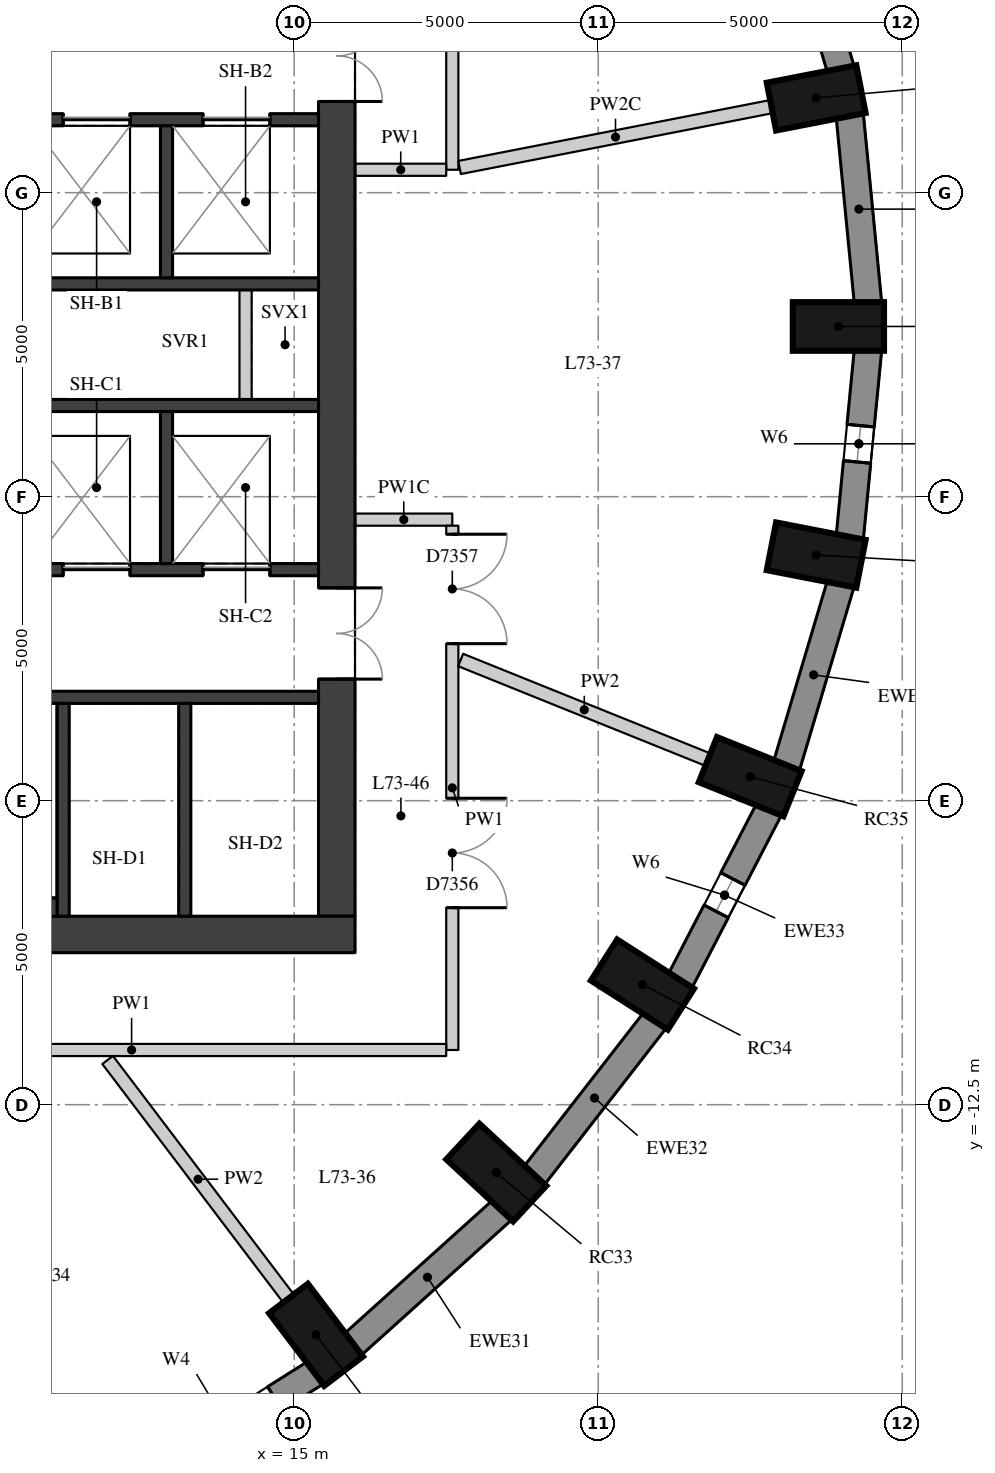
"""IFC4 building model, lengths in metres.
Left out: names, types, materials, properties, quantities, classifications, styles, units other than length and angle.
Written with IfcOpenShell. Run it as: python <this file> out.ifc"""

import sys

from ifc_helpers import new_model, si_unit, direction, frame, frame_2d, origin, origin_2d, place, context, subcontext, project, spatial, rectangle, extrude, element, fill, save


model = new_model("IFC4")
c1 = context("Model", 3, precision=1e-05, world=origin(), true_north=direction((0.0, 1.0)))
c2 = subcontext(c1, "Body", "Model", "MODEL_VIEW")
j1 = project(units=[si_unit("LENGTHUNIT", "METRE"), si_unit("PLANEANGLEUNIT", "RADIAN")], contexts=[c1])
p1 = place(None, origin())
s1 = spatial("IfcSite", under=j1, at=p1, CompositionType="ELEMENT")
p2 = place(p1, origin())
s2 = spatial("IfcBuilding", under=s1, at=p2, CompositionType="ELEMENT")
p3 = place(p2, frame((0.0, 0.0, 256.4)))
s3 = spatial("IfcBuildingStorey", under=s2, at=p3, CompositionType="ELEMENT", Elevation=256.4)
for number, where, z_axis, x_axis in (
    (1, (23.95, 0.3, 0.0), (0.0, 0.0, 1.0), (1.0, 0.0, 0.0)),
    (2, (23.585, 4.06, 0.0), (0.0, 0.0, 1.0), (0.981, 0.192, 0.0)),
    (3, (15.359, -16.285, 0.0), (0.0, 0.0, 1.0), (0.604, -0.797, 0.0)),
    (4, (18.323, -13.616, 0.0), (0.0, 0.0, 1.0), (0.733, -0.681, 0.0)),
    (5, (20.728, -10.525, 0.0), (0.0, 0.0, 1.0), (0.843, -0.539, 0.0)),
    (6, (22.5, -7.105, 0.0), (0.0, 0.0, 1.0), (0.928, -0.374, 0.0)),
    (7, (23.585, -3.459, 0.0), (0.0, 0.0, 1.0), (0.981, -0.192, 0.0)),
):
    element("IfcColumn", number, at=place(p3, frame(where, z_axis=z_axis, x_axis=x_axis)), inside=s3, PredefinedType="COLUMN", context=c2, shape_type="SweptSolid", body=[
        extrude(rectangle(XDim=1.5, YDim=0.8, at=origin_2d()), origin(), (0.0, 0.0, 1.0), 3.3),
    ])
p4 = place(p3, frame((24.437, 0.68, 0.0), z_axis=(0.0, 0.0, 1.0), x_axis=(-0.096740086873, 0.995309678237, 0.0)))
e8 = element("IfcWall", 8, at=p4, inside=s3, PredefinedType="SOLIDWALL", context=c2, shape_type="SweptSolid", body=[
    extrude(rectangle(XDim=3.114, YDim=0.45, at=frame_2d((1.557, 0.0))), origin(), (0.0, 0.0, 1.0), 2.95),
])
p5 = place(p3, frame((23.99, 4.526, 0.0), z_axis=(0.0, 0.0, 1.0), x_axis=(-0.285263800865, 0.958449040855, 0.0)))
e9 = element("IfcWall", 9, at=p5, inside=s3, PredefinedType="SOLIDWALL", context=c2, shape_type="SweptSolid", body=[
    extrude(rectangle(XDim=3.139, YDim=0.45, at=frame_2d((1.57, 0.0))), origin(), (0.0, 0.0, 1.0), 2.95),
])
p6 = place(p5, frame((1.27, 0.0, 0.4)))
e10 = element("IfcOpeningElement", 10, at=p6, cuts=e9, PredefinedType="OPENING", context=c2, shape_type="SweptSolid", body=[
    extrude(rectangle(XDim=0.6, YDim=1.75, at=frame_2d((0.3, 0.875))), frame((0.0, 0.235, 0.0), z_axis=(0.0, -1.0, 0.0), x_axis=(1.0, 0.0, 0.0)), (0.0, 0.0, 1.0), 0.47),
])
p7 = place(p3, frame((12.49, -18.711, 0.0), z_axis=(0.0, 0.0, 1.0), x_axis=(0.845929139811, 0.53329531258, 0.0)))
e11 = element("IfcWall", 11, at=p7, inside=s3, PredefinedType="SOLIDWALL", context=c2, shape_type="SweptSolid", body=[
    extrude(rectangle(XDim=3.385, YDim=0.45, at=frame_2d((1.692, 0.0))), origin(), (0.0, 0.0, 1.0), 2.95),
])
p8 = place(p7, frame((0.792, 0.0, 0.4)))
e12 = element("IfcOpeningElement", 12, at=p8, cuts=e11, PredefinedType="OPENING", context=c2, shape_type="SweptSolid", body=[
    extrude(rectangle(XDim=1.8, YDim=1.75, at=frame_2d((0.9, 0.875))), frame((0.0, 0.235, 0.0), z_axis=(0.0, -1.0, 0.0), x_axis=(1.0, 0.0, 0.0)), (0.0, 0.0, 1.0), 0.47),
])
p9 = place(p3, frame((15.959, -16.448, 0.0), z_axis=(0.0, 0.0, 1.0), x_axis=(0.743166014219, 0.669107073128, 0.0)))
e13 = element("IfcWall", 13, at=p9, inside=s3, PredefinedType="SOLIDWALL", context=c2, shape_type="SweptSolid", body=[
    extrude(rectangle(XDim=3.316, YDim=0.45, at=frame_2d((1.658, 0.0))), origin(), (0.0, 0.0, 1.0), 2.95),
])
p10 = place(p3, frame((18.942, -13.672, 0.0), z_axis=(0.0, 0.0, 1.0), x_axis=(0.613898970825, 0.789384604372, 0.0)))
e14 = element("IfcWall", 14, at=p10, inside=s3, PredefinedType="SOLIDWALL", context=c2, shape_type="SweptSolid", body=[
    extrude(rectangle(XDim=3.247, YDim=0.45, at=frame_2d((1.624, 0.0))), origin(), (0.0, 0.0, 1.0), 2.95),
])
p11 = place(p3, frame((21.345, -10.468, 0.0), z_axis=(0.0, 0.0, 1.0), x_axis=(0.459921155255, 0.887959757505, 0.0)))
e15 = element("IfcWall", 15, at=p11, inside=s3, PredefinedType="SOLIDWALL", context=c2, shape_type="SweptSolid", body=[
    extrude(rectangle(XDim=3.186, YDim=0.45, at=frame_2d((1.593, 0.0))), origin(), (0.0, 0.0, 1.0), 2.95),
])
p12 = place(p11, frame((1.293, 0.0, 0.4)))
e16 = element("IfcOpeningElement", 16, at=p12, cuts=e15, PredefinedType="OPENING", context=c2, shape_type="SweptSolid", body=[
    extrude(rectangle(XDim=0.6, YDim=1.75, at=frame_2d((0.3, 0.875))), frame((0.0, 0.235, 0.0), z_axis=(0.0, -1.0, 0.0), x_axis=(1.0, 0.0, 0.0)), (0.0, 0.0, 1.0), 0.47),
])
p13 = place(p3, frame((23.094, -6.935, 0.0), z_axis=(0.0, 0.0, 1.0), x_axis=(0.285263800865, 0.958449040855, 0.0)))
e17 = element("IfcWall", 17, at=p13, inside=s3, PredefinedType="SOLIDWALL", context=c2, shape_type="SweptSolid", body=[
    extrude(rectangle(XDim=3.139, YDim=0.45, at=frame_2d((1.57, 0.0))), origin(), (0.0, 0.0, 1.0), 2.95),
])
p14 = place(p3, frame((24.136, -3.18, 0.0), z_axis=(0.0, 0.0, 1.0), x_axis=(0.09673253904, 0.995310411827, 0.0)))
e18 = element("IfcWall", 18, at=p14, inside=s3, PredefinedType="SOLIDWALL", context=c2, shape_type="SweptSolid", body=[
    extrude(rectangle(XDim=3.115, YDim=0.45, at=frame_2d((1.557, 0.0))), origin(), (0.0, 0.0, 1.0), 2.95),
])
p15 = place(p14, frame((1.257, 0.0, 0.4)))
e19 = element("IfcOpeningElement", 19, at=p15, cuts=e18, PredefinedType="OPENING", context=c2, shape_type="SweptSolid", body=[
    extrude(rectangle(XDim=0.6, YDim=1.75, at=frame_2d((0.3, 0.875))), frame((0.0, 0.235, 0.0), z_axis=(0.0, -1.0, 0.0), x_axis=(1.0, 0.0, 0.0)), (0.0, 0.0, 1.0), 0.47),
])
p16 = place(p3, frame((15.7, -9.4, 0.0), z_axis=(0.0, 0.0, 1.0), x_axis=(0.0, 1.0, 0.0)))
e20 = element("IfcWall", 20, at=p16, inside=s3, PredefinedType="SHEAR", context=c2, shape_type="SweptSolid", body=[
    extrude(rectangle(XDim=18.8, YDim=0.6, at=frame_2d((9.4, 0.0))), origin(), (0.0, 0.0, 1.0), 2.95),
])
p17 = place(p16, frame((13.4, 0.0, 0.0)))
e21 = element("IfcOpeningElement", 21, at=p17, cuts=e20, PredefinedType="OPENING", context=c2, shape_type="SweptSolid", body=[
    extrude(rectangle(XDim=1.5, YDim=2.1, at=frame_2d((0.75, 1.05))), frame((0.0, 0.31, 0.0), z_axis=(0.0, -1.0, 0.0), x_axis=(1.0, 0.0, 0.0)), (0.0, 0.0, 1.0), 0.62),
])
p18 = place(p16, frame((3.9, 0.0, 0.0)))
e22 = element("IfcOpeningElement", 22, at=p18, cuts=e20, PredefinedType="OPENING", context=c2, shape_type="SweptSolid", body=[
    extrude(rectangle(XDim=1.5, YDim=2.1, at=frame_2d((0.75, 1.05))), frame((0.0, 0.31, 0.0), z_axis=(0.0, -1.0, 0.0), x_axis=(1.0, 0.0, 0.0)), (0.0, 0.0, 1.0), 0.62),
])
p19 = place(p3, frame((4.0, -9.7, 0.0), z_axis=(0.0, 0.0, 1.0), x_axis=(1.0, 0.0, 0.0)))
e23 = element("IfcWall", 23, at=p19, inside=s3, PredefinedType="SHEAR", context=c2, shape_type="SweptSolid", body=[
    extrude(rectangle(XDim=12.0, YDim=0.6, at=frame_2d((6.0, 0.0))), origin(), (0.0, 0.0, 1.0), 2.95),
])
p20 = place(p3, frame((4.6, 3.7, 0.0), z_axis=(0.0, 0.0, 1.0), x_axis=(1.0, 0.0, 0.0)))
e24 = element("IfcWall", 24, at=p20, inside=s3, PredefinedType="SHEAR", context=c2, shape_type="SweptSolid", body=[
    extrude(rectangle(XDim=10.8, YDim=0.2, at=frame_2d((5.4, 0.0))), origin(), (0.0, 0.0, 1.0), 2.95),
])
p21 = place(p20, frame((6.6, 0.0, 0.0)))
e25 = element("IfcOpeningElement", 25, at=p21, cuts=e24, PredefinedType="OPENING", context=c2, shape_type="SweptSolid", body=[
    extrude(rectangle(XDim=1.1, YDim=2.1, at=frame_2d((0.55, 1.05))), frame((0.0, 0.11, 0.0), z_axis=(0.0, -1.0, 0.0), x_axis=(1.0, 0.0, 0.0)), (0.0, 0.0, 1.0), 0.22),
])
p22 = place(p20, frame((8.9, 0.0, 0.0)))
e26 = element("IfcOpeningElement", 26, at=p22, cuts=e24, PredefinedType="OPENING", context=c2, shape_type="SweptSolid", body=[
    extrude(rectangle(XDim=1.1, YDim=2.1, at=frame_2d((0.55, 1.05))), frame((0.0, 0.11, 0.0), z_axis=(0.0, -1.0, 0.0), x_axis=(1.0, 0.0, 0.0)), (0.0, 0.0, 1.0), 0.22),
])
for number, where, z_axis, x_axis in (
    (27, (4.6, 1.0, 0.0), (0.0, 0.0, 1.0), (1.0, 0.0, 0.0)),
    (28, (4.6, -1.0, 0.0), (0.0, 0.0, 1.0), (1.0, 0.0, 0.0)),
):
    element("IfcWall", number, at=place(p3, frame(where, z_axis=z_axis, x_axis=x_axis)), inside=s3, PredefinedType="SHEAR", context=c2, shape_type="SweptSolid", body=[
        extrude(rectangle(XDim=10.8, YDim=0.2, at=frame_2d((5.4, 0.0))), origin(), (0.0, 0.0, 1.0), 2.95),
    ])
p23 = place(p3, frame((4.6, -3.7, 0.0), z_axis=(0.0, 0.0, 1.0), x_axis=(1.0, 0.0, 0.0)))
e29 = element("IfcWall", 29, at=p23, inside=s3, PredefinedType="SHEAR", context=c2, shape_type="SweptSolid", body=[
    extrude(rectangle(XDim=10.8, YDim=0.2, at=frame_2d((5.4, 0.0))), origin(), (0.0, 0.0, 1.0), 2.95),
])
p24 = place(p23, frame((6.6, 0.0, 0.0)))
e30 = element("IfcOpeningElement", 30, at=p24, cuts=e29, PredefinedType="OPENING", context=c2, shape_type="SweptSolid", body=[
    extrude(rectangle(XDim=1.1, YDim=2.1, at=frame_2d((0.55, 1.05))), frame((0.0, 0.11, 0.0), z_axis=(0.0, -1.0, 0.0), x_axis=(1.0, 0.0, 0.0)), (0.0, 0.0, 1.0), 0.22),
])
p25 = place(p23, frame((8.9, 0.0, 0.0)))
e31 = element("IfcOpeningElement", 31, at=p25, cuts=e29, PredefinedType="OPENING", context=c2, shape_type="SweptSolid", body=[
    extrude(rectangle(XDim=1.1, YDim=2.1, at=frame_2d((0.55, 1.05))), frame((0.0, 0.11, 0.0), z_axis=(0.0, -1.0, 0.0), x_axis=(1.0, 0.0, 0.0)), (0.0, 0.0, 1.0), 0.22),
])
p26 = place(p3, frame((4.6, -5.8, 0.0), z_axis=(0.0, 0.0, 1.0), x_axis=(1.0, 0.0, 0.0)))
e32 = element("IfcWall", 32, at=p26, inside=s3, PredefinedType="SHEAR", context=c2, shape_type="SweptSolid", body=[
    extrude(rectangle(XDim=10.8, YDim=0.2, at=frame_2d((5.4, 0.0))), origin(), (0.0, 0.0, 1.0), 2.95),
])
for number, where, z_axis, x_axis in (
    (33, (11.2, -9.4, 0.0), (0.0, 0.0, 1.0), (0.0, 1.0, 0.0)),
    (34, (13.2, -9.4, 0.0), (0.0, 0.0, 1.0), (0.0, 1.0, 0.0)),
):
    element("IfcWall", number, at=place(p3, frame(where, z_axis=z_axis, x_axis=x_axis)), inside=s3, PredefinedType="SHEAR", context=c2, shape_type="SweptSolid", body=[
        extrude(rectangle(XDim=3.5, YDim=0.2, at=frame_2d((1.75, 0.0))), origin(), (0.0, 0.0, 1.0), 2.95),
    ])
for number, where, z_axis, x_axis in (
    (35, (12.9, 1.1, 0.0), (0.0, 0.0, 1.0), (0.0, 1.0, 0.0)),
    (36, (12.9, -3.6, 0.0), (0.0, 0.0, 1.0), (0.0, 1.0, 0.0)),
):
    element("IfcWall", number, at=place(p3, frame(where, z_axis=z_axis, x_axis=x_axis)), inside=s3, PredefinedType="SHEAR", context=c2, shape_type="SweptSolid", body=[
        extrude(rectangle(XDim=2.5, YDim=0.2, at=frame_2d((1.25, 0.0))), origin(), (0.0, 0.0, 1.0), 2.95),
    ])
p27 = place(p3, frame((14.2, -0.9, 0.0), z_axis=(0.0, 0.0, 1.0), x_axis=(0.0, 1.0, 0.0)))
e37 = element("IfcWall", 37, at=p27, inside=s3, PredefinedType="PARTITIONING", context=c2, shape_type="SweptSolid", body=[
    extrude(rectangle(XDim=1.8, YDim=0.2, at=frame_2d((0.9, 0.0))), origin(), (0.0, 0.0, 1.0), 2.95),
])
p28 = place(p3, frame((6.22, -9.25, 0.0), z_axis=(0.0, 0.0, 1.0), x_axis=(1.0, 0.0, 0.0)))
e38 = element("IfcWall", 38, at=p28, inside=s3, PredefinedType="PARTITIONING", context=c2, shape_type="SweptSolid", body=[
    extrude(rectangle(XDim=4.88, YDim=0.3, at=frame_2d((2.44, 0.0))), origin(), (0.0, 0.0, 1.0), 2.95),
])
p29 = place(p3, frame((17.6, 11.5, 0.0), z_axis=(0.0, 0.0, 1.0), x_axis=(0.0, -1.0, 0.0)))
e39 = element("IfcWall", 39, at=p29, inside=s3, PredefinedType="PARTITIONING", context=c2, shape_type="SweptSolid", body=[
    extrude(rectangle(XDim=8.623, YDim=0.2, at=frame_2d((4.312, 0.0))), origin(), (0.0, 0.0, 1.0), 2.95),
])
p30 = place(p3, frame((17.5, 2.877, 0.0), z_axis=(0.0, 0.0, 1.0), x_axis=(-1.0, 0.0, 0.0)))
e40 = element("IfcWall", 40, at=p30, inside=s3, PredefinedType="PARTITIONING", context=c2, shape_type="SweptSolid", body=[
    extrude(rectangle(XDim=1.496, YDim=0.2, at=frame_2d((0.748, 0.0))), origin(), (0.0, 0.0, 1.0), 2.95),
])
p31 = place(p3, frame((16.004, -2.877, 0.0), z_axis=(0.0, 0.0, 1.0), x_axis=(1.0, 0.0, 0.0)))
e41 = element("IfcWall", 41, at=p31, inside=s3, PredefinedType="PARTITIONING", context=c2, shape_type="SweptSolid", body=[
    extrude(rectangle(XDim=1.596, YDim=0.2, at=frame_2d((0.798, 0.0))), origin(), (0.0, 0.0, 1.0), 2.5),
])
p32 = place(p3, frame((17.6, -2.977, 0.0), z_axis=(0.0, 0.0, 1.0), x_axis=(0.0, -1.0, 0.0)))
e42 = element("IfcWall", 42, at=p32, inside=s3, PredefinedType="PARTITIONING", context=c2, shape_type="SweptSolid", body=[
    extrude(rectangle(XDim=8.623, YDim=0.2, at=frame_2d((4.312, 0.0))), origin(), (0.0, 0.0, 1.0), 2.95),
])
p33 = place(p32, frame((4.483, 0.0, 0.0)))
e43 = element("IfcOpeningElement", 43, at=p33, cuts=e42, PredefinedType="OPENING", context=c2, shape_type="SweptSolid", body=[
    extrude(rectangle(XDim=1.8, YDim=2.1, at=frame_2d((0.9, 1.05))), frame((0.0, 0.11, 0.0), z_axis=(0.0, -1.0, 0.0), x_axis=(1.0, 0.0, 0.0)), (0.0, 0.0, 1.0), 0.22),
])
p34 = place(p32, frame((0.14, 0.0, 0.0)))
e44 = element("IfcOpeningElement", 44, at=p34, cuts=e42, PredefinedType="OPENING", context=c2, shape_type="SweptSolid", body=[
    extrude(rectangle(XDim=1.8, YDim=2.1, at=frame_2d((0.9, 1.05))), frame((0.0, 0.11, 0.0), z_axis=(0.0, -1.0, 0.0), x_axis=(1.0, 0.0, 0.0)), (0.0, 0.0, 1.0), 0.22),
])
p35 = place(p3, frame((17.5, -11.6, 0.0), z_axis=(0.0, 0.0, 1.0), x_axis=(-1.0, 0.0, 0.0)))
e45 = element("IfcWall", 45, at=p35, inside=s3, PredefinedType="PARTITIONING", context=c2, shape_type="SweptSolid", body=[
    extrude(rectangle(XDim=10.348, YDim=0.2, at=frame_2d((5.174, 0.0))), origin(), (0.0, 0.0, 1.0), 2.95),
])
p36 = place(p35, frame((8.462, 0.0, 0.0)))
e46 = element("IfcOpeningElement", 46, at=p36, cuts=e45, PredefinedType="OPENING", context=c2, shape_type="SweptSolid", body=[
    extrude(rectangle(XDim=1.1, YDim=2.1, at=frame_2d((0.55, 1.05))), frame((0.0, 0.11, 0.0), z_axis=(0.0, -1.0, 0.0), x_axis=(1.0, 0.0, 0.0)), (0.0, 0.0, 1.0), 0.22),
])
p37 = place(p3, frame((22.849, 3.916, 0.0), z_axis=(0.0, 0.0, 1.0), x_axis=(-0.981474096155, -0.191594881394, 0.0)))
e47 = element("IfcWall", 47, at=p37, inside=s3, PredefinedType="PARTITIONING", context=c2, shape_type="SweptSolid", body=[
    extrude(rectangle(XDim=5.226, YDim=0.22, at=frame_2d((2.613, 0.0))), origin(), (0.0, 0.0, 1.0), 2.5),
])
p38 = place(p3, frame((14.906, -15.687, 0.0), z_axis=(0.0, 0.0, 1.0), x_axis=(-0.604078206052, 0.796925041, 0.0)))
e48 = element("IfcWall", 48, at=p38, inside=s3, PredefinedType="PARTITIONING", context=c2, shape_type="SweptSolid", body=[
    extrude(rectangle(XDim=4.923, YDim=0.22, at=frame_2d((2.462, 0.0))), origin(), (0.0, 0.0, 1.0), 2.95),
])
p39 = place(p3, frame((21.804, -6.824, 0.0), z_axis=(0.0, 0.0, 1.0), x_axis=(-0.927528978592, 0.373751245981, 0.0)))
e49 = element("IfcWall", 49, at=p39, inside=s3, PredefinedType="PARTITIONING", context=c2, shape_type="SweptSolid", body=[
    extrude(rectangle(XDim=4.384, YDim=0.22, at=frame_2d((2.192, 0.0))), origin(), (0.0, 0.0, 1.0), 2.95),
])
p40 = place(p12, origin())
e50 = element("IfcWindow", 50, at=p40, inside=s3, PartitioningType="SINGLE_PANEL", PredefinedType="WINDOW", context=c2, shape_type="SweptSolid", body=[
    extrude(rectangle(XDim=0.6, YDim=1.75, at=frame_2d((0.3, 0.875))), frame((0.0, 0.035, 0.0), z_axis=(0.0, -1.0, 0.0), x_axis=(1.0, 0.0, 0.0)), (0.0, 0.0, 1.0), 0.06),
])
fill(e16, e50)
p41 = place(p15, origin())
e51 = element("IfcWindow", 51, at=p41, inside=s3, PartitioningType="SINGLE_PANEL", PredefinedType="WINDOW", context=c2, shape_type="SweptSolid", body=[
    extrude(rectangle(XDim=0.6, YDim=1.75, at=frame_2d((0.3, 0.875))), frame((0.0, 0.035, 0.0), z_axis=(0.0, -1.0, 0.0), x_axis=(1.0, 0.0, 0.0)), (0.0, 0.0, 1.0), 0.06),
])
fill(e19, e51)
p42 = place(p17, origin())
e52 = element("IfcDoor", 52, at=p42, inside=s3, OperationType="DOUBLE_DOOR_SINGLE_SWING", PredefinedType="DOOR", context=c2, shape_type="SweptSolid", body=[
    extrude(rectangle(XDim=1.5, YDim=2.1, at=frame_2d((0.75, 1.05))), frame((0.0, 0.025, 0.0), z_axis=(0.0, -1.0, 0.0), x_axis=(1.0, 0.0, 0.0)), (0.0, 0.0, 1.0), 0.05),
])
fill(e21, e52)
p43 = place(p18, origin())
e53 = element("IfcDoor", 53, at=p43, inside=s3, OperationType="DOUBLE_DOOR_SINGLE_SWING", PredefinedType="DOOR", context=c2, shape_type="SweptSolid", body=[
    extrude(rectangle(XDim=1.5, YDim=2.1, at=frame_2d((0.75, 1.05))), frame((0.0, 0.025, 0.0), z_axis=(0.0, -1.0, 0.0), x_axis=(1.0, 0.0, 0.0)), (0.0, 0.0, 1.0), 0.05),
])
fill(e22, e53)
p44 = place(p21, origin())
e54 = element("IfcDoor", 54, at=p44, inside=s3, OperationType="DOUBLE_DOOR_SLIDING", PredefinedType="DOOR", context=c2, shape_type="SweptSolid", body=[
    extrude(rectangle(XDim=1.1, YDim=2.1, at=frame_2d((0.55, 1.05))), frame((0.0, 0.025, 0.0), z_axis=(0.0, -1.0, 0.0), x_axis=(1.0, 0.0, 0.0)), (0.0, 0.0, 1.0), 0.05),
])
fill(e25, e54)
p45 = place(p22, origin())
e55 = element("IfcDoor", 55, at=p45, inside=s3, OperationType="DOUBLE_DOOR_SLIDING", PredefinedType="DOOR", context=c2, shape_type="SweptSolid", body=[
    extrude(rectangle(XDim=1.1, YDim=2.1, at=frame_2d((0.55, 1.05))), frame((0.0, 0.025, 0.0), z_axis=(0.0, -1.0, 0.0), x_axis=(1.0, 0.0, 0.0)), (0.0, 0.0, 1.0), 0.05),
])
fill(e26, e55)
p46 = place(p24, origin())
e56 = element("IfcDoor", 56, at=p46, inside=s3, OperationType="DOUBLE_DOOR_SLIDING", PredefinedType="DOOR", context=c2, shape_type="SweptSolid", body=[
    extrude(rectangle(XDim=1.1, YDim=2.1, at=frame_2d((0.55, 1.05))), frame((0.0, 0.025, 0.0), z_axis=(0.0, -1.0, 0.0), x_axis=(1.0, 0.0, 0.0)), (0.0, 0.0, 1.0), 0.05),
])
fill(e30, e56)
p47 = place(p25, origin())
e57 = element("IfcDoor", 57, at=p47, inside=s3, OperationType="DOUBLE_DOOR_SLIDING", PredefinedType="DOOR", context=c2, shape_type="SweptSolid", body=[
    extrude(rectangle(XDim=1.1, YDim=2.1, at=frame_2d((0.55, 1.05))), frame((0.0, 0.025, 0.0), z_axis=(0.0, -1.0, 0.0), x_axis=(1.0, 0.0, 0.0)), (0.0, 0.0, 1.0), 0.05),
])
fill(e31, e57)
p48 = place(p33, origin())
e58 = element("IfcDoor", 58, at=p48, inside=s3, OperationType="DOUBLE_DOOR_SINGLE_SWING", PredefinedType="DOOR", context=c2, shape_type="SweptSolid", body=[
    extrude(rectangle(XDim=1.8, YDim=2.1, at=frame_2d((0.9, 1.05))), frame((0.0, 0.025, 0.0), z_axis=(0.0, -1.0, 0.0), x_axis=(1.0, 0.0, 0.0)), (0.0, 0.0, 1.0), 0.05),
])
fill(e43, e58)
p49 = place(p34, origin())
e59 = element("IfcDoor", 59, at=p49, inside=s3, OperationType="DOUBLE_DOOR_SINGLE_SWING", PredefinedType="DOOR", context=c2, shape_type="SweptSolid", body=[
    extrude(rectangle(XDim=1.8, YDim=2.1, at=frame_2d((0.9, 1.05))), frame((0.0, 0.025, 0.0), z_axis=(0.0, -1.0, 0.0), x_axis=(1.0, 0.0, 0.0)), (0.0, 0.0, 1.0), 0.05),
])
fill(e44, e59)
save(model, sys.argv[1])
